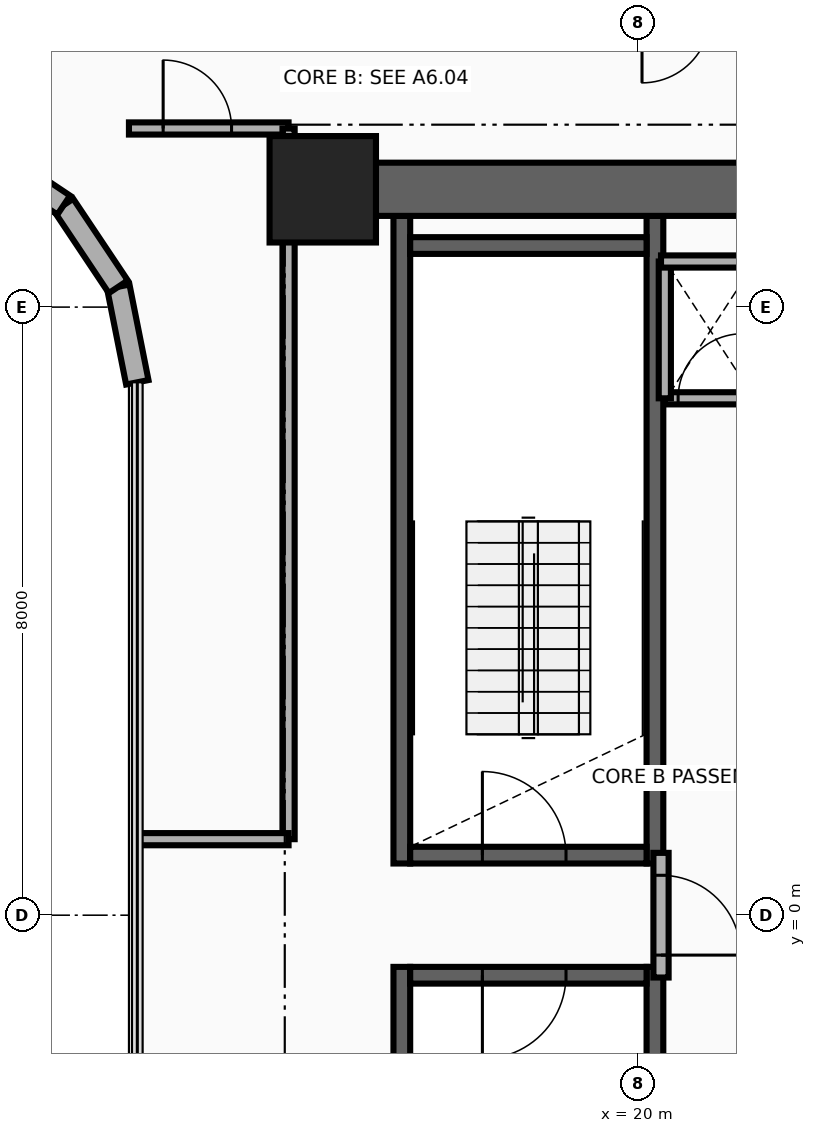
"""IFC4 building model, lengths in metres.
Left out: names, types, materials, properties, quantities, classifications, styles, units other than length and angle.
Written with IfcOpenShell. Run it as: python <this file> out.ifc"""

import sys

from ifc_helpers import new_model, si_unit, direction, frame, frame_2d, origin, origin_2d, place, context, subcontext, project, spatial, rectangle, extrude, source, transform, mapped, element, fill, save


model = new_model("IFC4")
c1 = context("Model", 3, precision=1e-05, world=origin(), true_north=direction((0.0, 1.0)))
c2 = subcontext(c1, "Body", "Model", "MODEL_VIEW")
j1 = project(units=[si_unit("LENGTHUNIT", "METRE"), si_unit("PLANEANGLEUNIT", "RADIAN")], contexts=[c1])
p1 = place(None, origin())
s1 = spatial("IfcSite", under=j1, at=p1, CompositionType="ELEMENT")
p2 = place(p1, origin())
s2 = spatial("IfcBuilding", under=s1, at=p2, CompositionType="ELEMENT")
p3 = place(p2, frame((0.0, 0.0, 81.5)))
s3 = spatial("IfcBuildingStorey", under=s2, at=p3, CompositionType="ELEMENT", Elevation=81.5)
for number, where, z_axis, x_axis in (
    (1, (16.89, 0.68, 0.0), (0.0, 0.0, 1.0), (0.0, 1.0, 0.0)),
    (2, (20.22, 0.68, 0.0), (0.0, 0.0, 1.0), (0.0, 1.0, 0.0)),
):
    element("IfcWall", number, at=place(p3, frame(where, z_axis=z_axis, x_axis=x_axis)), inside=s3, PredefinedType="SHEAR", context=c2, shape_type="SweptSolid", body=[
        extrude(rectangle(XDim=8.52, YDim=0.22, at=frame_2d((4.26, 0.0))), origin(), (0.0, 0.0, 1.0), 3.46),
    ])
p4 = place(p3, frame((17.0, 0.79, 0.0), z_axis=(0.0, 0.0, 1.0), x_axis=(1.0, 0.0, 0.0)))
e3 = element("IfcWall", 3, at=p4, inside=s3, PredefinedType="SHEAR", context=c2, shape_type="SweptSolid", body=[
    extrude(rectangle(XDim=3.11, YDim=0.22, at=frame_2d((1.555, 0.0))), origin(), (0.0, 0.0, 1.0), 3.46),
])
p5 = place(p4, frame((0.95, 0.0, 0.0)))
e4 = element("IfcOpeningElement", 4, at=p5, cuts=e3, PredefinedType="OPENING", context=c2, shape_type="SweptSolid", body=[
    extrude(rectangle(XDim=1.1, YDim=2.15, at=frame_2d((0.55, 1.075))), frame((0.0, 0.125, 0.0), z_axis=(0.0, -1.0, 0.0), x_axis=(1.0, 0.0, 0.0)), (0.0, 0.0, 1.0), 0.25),
])
p6 = place(p3, frame((17.0, 8.81, 0.0), z_axis=(0.0, 0.0, 1.0), x_axis=(1.0, 0.0, 0.0)))
e5 = element("IfcWall", 5, at=p6, inside=s3, PredefinedType="SHEAR", context=c2, shape_type="SweptSolid", body=[
    extrude(rectangle(XDim=3.11, YDim=0.22, at=frame_2d((1.555, 0.0))), origin(), (0.0, 0.0, 1.0), 3.46),
])
for number, where, z_axis, x_axis in (
    (6, (16.89, -9.2, 0.0), (0.0, 0.0, 1.0), (0.0, 1.0, 0.0)),
    (7, (20.22, -9.2, 0.0), (0.0, 0.0, 1.0), (0.0, 1.0, 0.0)),
):
    element("IfcWall", number, at=place(p3, frame(where, z_axis=z_axis, x_axis=x_axis)), inside=s3, PredefinedType="SHEAR", context=c2, shape_type="SweptSolid", body=[
        extrude(rectangle(XDim=8.52, YDim=0.22, at=frame_2d((4.26, 0.0))), origin(), (0.0, 0.0, 1.0), 3.46),
    ])
p7 = place(p3, frame((17.0, -0.79, 0.0), z_axis=(0.0, 0.0, 1.0), x_axis=(1.0, 0.0, 0.0)))
e8 = element("IfcWall", 8, at=p7, inside=s3, PredefinedType="SHEAR", context=c2, shape_type="SweptSolid", body=[
    extrude(rectangle(XDim=3.11, YDim=0.22, at=frame_2d((1.555, 0.0))), origin(), (0.0, 0.0, 1.0), 3.46),
])
p8 = place(p7, frame((0.95, 0.0, 0.0)))
e9 = element("IfcOpeningElement", 9, at=p8, cuts=e8, PredefinedType="OPENING", context=c2, shape_type="SweptSolid", body=[
    extrude(rectangle(XDim=1.1, YDim=2.15, at=frame_2d((0.55, 1.075))), frame((0.0, 0.125, 0.0), z_axis=(0.0, -1.0, 0.0), x_axis=(1.0, 0.0, 0.0)), (0.0, 0.0, 1.0), 0.25),
])
p9 = place(p3, frame((15.85, 9.55, 0.0), z_axis=(0.0, 0.0, 1.0), x_axis=(1.0, 0.0, 0.0)))
e10 = element("IfcWall", 10, at=p9, inside=s3, PredefinedType="SHEAR", context=c2, shape_type="SweptSolid", body=[
    extrude(rectangle(XDim=9.0, YDim=0.7, at=frame_2d((4.5, 0.0))), origin(), (0.0, 0.0, 1.0), 3.46),
])
m1 = source(origin(), c2, "Body", "SweptSolid", [
    extrude(rectangle(XDim=1.4, YDim=1.4, at=origin_2d()), origin(), (0.0, 0.0, 1.0), 3.7),
])
p10 = place(p3, frame((15.85, 9.55, 0.0), z_axis=(0.0, 0.0, 1.0), x_axis=(1.0, 0.0, 0.0)))
e11 = element("IfcColumn", 11, at=p10, inside=s3, PredefinedType="COLUMN", context=c2, shape_type="MappedRepresentation", body=[
    mapped(m1, transform((0.0, 0.0, 0.0), x_axis=(1.0, 0.0, 0.0), y_axis=(0.0, 1.0, 0.0), z_axis=(0.0, 0.0, 1.0), scale=1.0)),
])
p11 = place(p3, frame((13.41, 7.011, 0.0), z_axis=(0.0, 0.0, 1.0), x_axis=(-0.195090163074, 0.980785312019, 0.0)))
e12 = element("IfcWall", 12, at=p11, inside=s3, PredefinedType="SOLIDWALL", context=c2, shape_type="SweptSolid", body=[
    extrude(rectangle(XDim=1.281, YDim=0.3, at=frame_2d((0.641, 0.0))), origin(), (0.0, 0.0, 1.0), 3.46),
])
for number, where, z_axis, x_axis in (
    (13, (13.16, 8.268, 0.0), (0.0, 0.0, 1.0), (-0.556, 0.831, 0.0)),
    (14, (12.442, 9.342, 0.0), (0.0, 0.0, 1.0), (-0.831, 0.556, 0.0)),
):
    element("IfcWall", number, at=place(p3, frame(where, z_axis=z_axis, x_axis=x_axis)), inside=s3, PredefinedType="SOLIDWALL", context=c2, shape_type="SweptSolid", body=[
        extrude(rectangle(XDim=1.292, YDim=0.3, at=frame_2d((0.646, 0.0))), origin(), (0.0, 0.0, 1.0), 3.46),
    ])
p12 = place(p3, frame((20.3, -0.82, 0.0), z_axis=(0.0, 0.0, 1.0), x_axis=(0.0, 1.0, 0.0)))
e15 = element("IfcWall", 15, at=p12, inside=s3, PredefinedType="PARTITIONING", context=c2, shape_type="SweptSolid", body=[
    extrude(rectangle(XDim=1.64, YDim=0.2, at=frame_2d((0.82, 0.0))), origin(), (0.0, 0.0, 1.0), 3.46),
])
p13 = place(p12, frame((0.295, 0.0, 0.0)))
e16 = element("IfcOpeningElement", 16, at=p13, cuts=e15, PredefinedType="OPENING", context=c2, shape_type="SweptSolid", body=[
    extrude(rectangle(XDim=1.05, YDim=2.15, at=frame_2d((0.525, 1.075))), frame((0.0, 0.115, 0.0), z_axis=(0.0, -1.0, 0.0), x_axis=(1.0, 0.0, 0.0)), (0.0, 0.0, 1.0), 0.23),
])
p14 = place(p3, frame((20.35, 6.8, 0.0), z_axis=(0.0, 0.0, 1.0), x_axis=(1.0, 0.0, 0.0)))
e17 = element("IfcWall", 17, at=p14, inside=s3, PredefinedType="PARTITIONING", context=c2, shape_type="SweptSolid", body=[
    extrude(rectangle(XDim=1.2, YDim=0.16, at=frame_2d((0.6, 0.0))), origin(), (0.0, 0.0, 1.0), 3.46),
])
p15 = place(p14, frame((0.175, 0.0, 0.0)))
e18 = element("IfcOpeningElement", 18, at=p15, cuts=e17, PredefinedType="OPENING", context=c2, shape_type="SweptSolid", body=[
    extrude(rectangle(XDim=0.85, YDim=2.05, at=frame_2d((0.425, 1.025))), frame((0.0, 0.095, 0.0), z_axis=(0.0, -1.0, 0.0), x_axis=(1.0, 0.0, 0.0)), (0.0, 0.0, 1.0), 0.19),
])
p16 = place(p3, frame((20.35, 6.8, 0.0), z_axis=(0.0, 0.0, 1.0), x_axis=(0.0, 1.0, 0.0)))
e19 = element("IfcWall", 19, at=p16, inside=s3, PredefinedType="PARTITIONING", context=c2, shape_type="SweptSolid", body=[
    extrude(rectangle(XDim=1.8, YDim=0.16, at=frame_2d((0.9, 0.0))), origin(), (0.0, 0.0, 1.0), 3.46),
])
p17 = place(p3, frame((20.3, 8.6, 0.0), z_axis=(0.0, 0.0, 1.0), x_axis=(1.0, 0.0, 0.0)))
e20 = element("IfcWall", 20, at=p17, inside=s3, PredefinedType="PARTITIONING", context=c2, shape_type="SweptSolid", body=[
    extrude(rectangle(XDim=1.82, YDim=0.16, at=frame_2d((0.91, 0.0))), origin(), (0.0, 0.0, 1.0), 3.46),
])
p18 = place(p3, frame((13.3, 10.35, 0.0), z_axis=(0.0, 0.0, 1.0), x_axis=(1.0, 0.0, 0.0)))
e21 = element("IfcWall", 21, at=p18, inside=s3, PredefinedType="PARTITIONING", context=c2, shape_type="SweptSolid", body=[
    extrude(rectangle(XDim=2.1, YDim=0.16, at=frame_2d((1.05, 0.0))), origin(), (0.0, 0.0, 1.0), 2.583),
])
p19 = place(p18, frame((0.45, 0.0, 0.0)))
e22 = element("IfcOpeningElement", 22, at=p19, cuts=e21, PredefinedType="OPENING", context=c2, shape_type="SweptSolid", body=[
    extrude(rectangle(XDim=0.9, YDim=2.1, at=frame_2d((0.45, 1.05))), frame((0.0, 0.095, 0.0), z_axis=(0.0, -1.0, 0.0), x_axis=(1.0, 0.0, 0.0)), (0.0, 0.0, 1.0), 0.19),
])
p20 = place(p3, frame((15.4, 1.0, 0.0), z_axis=(0.0, 0.0, 1.0), x_axis=(0.0, 1.0, 0.0)))
e23 = element("IfcWall", 23, at=p20, inside=s3, PredefinedType="PARTITIONING", context=c2, shape_type="SweptSolid", body=[
    extrude(rectangle(XDim=9.35, YDim=0.16, at=frame_2d((4.675, 0.0))), origin(), (0.0, 0.0, 1.0), 2.245),
])
p21 = place(p3, frame((13.41, 1.0, 0.0), z_axis=(0.0, 0.0, 1.0), x_axis=(1.0, 0.0, 0.0)))
e24 = element("IfcWall", 24, at=p21, inside=s3, PredefinedType="PARTITIONING", context=c2, shape_type="SweptSolid", body=[
    extrude(rectangle(XDim=1.99, YDim=0.16, at=frame_2d((0.995, 0.0))), origin(), (0.0, 0.0, 1.0), 2.245),
])
p22 = place(p13, frame((1.05, 0.0, 0.0), z_axis=(0.0, 0.0, 1.0), x_axis=(-1.0, 0.0, 0.0)))
e25 = element("IfcDoor", 25, at=p22, inside=s3, OperationType="SINGLE_SWING_LEFT", PredefinedType="DOOR", context=c2, shape_type="SweptSolid", body=[
    extrude(rectangle(XDim=1.05, YDim=2.15, at=frame_2d((0.525, 1.075))), frame((0.0, 0.025, 0.0), z_axis=(0.0, -1.0, 0.0), x_axis=(1.0, 0.0, 0.0)), (0.0, 0.0, 1.0), 0.05),
])
fill(e16, e25)
p23 = place(p5, origin())
e26 = element("IfcDoor", 26, at=p23, inside=s3, OperationType="SINGLE_SWING_RIGHT", PredefinedType="DOOR", context=c2, shape_type="SweptSolid", body=[
    extrude(rectangle(XDim=1.1, YDim=2.15, at=frame_2d((0.55, 1.075))), frame((0.0, 0.025, 0.0), z_axis=(0.0, -1.0, 0.0), x_axis=(1.0, 0.0, 0.0)), (0.0, 0.0, 1.0), 0.05),
])
fill(e4, e26)
p24 = place(p8, frame((1.1, 0.0, 0.0), z_axis=(0.0, 0.0, 1.0), x_axis=(-1.0, 0.0, 0.0)))
e27 = element("IfcDoor", 27, at=p24, inside=s3, OperationType="SINGLE_SWING_LEFT", PredefinedType="DOOR", context=c2, shape_type="SweptSolid", body=[
    extrude(rectangle(XDim=1.1, YDim=2.15, at=frame_2d((0.55, 1.075))), frame((0.0, 0.025, 0.0), z_axis=(0.0, -1.0, 0.0), x_axis=(1.0, 0.0, 0.0)), (0.0, 0.0, 1.0), 0.05),
])
fill(e9, e27)
p25 = place(p15, origin())
e28 = element("IfcDoor", 28, at=p25, inside=s3, OperationType="SINGLE_SWING_RIGHT", PredefinedType="DOOR", context=c2, shape_type="SweptSolid", body=[
    extrude(rectangle(XDim=0.85, YDim=2.05, at=frame_2d((0.425, 1.025))), frame((0.0, 0.025, 0.0), z_axis=(0.0, -1.0, 0.0), x_axis=(1.0, 0.0, 0.0)), (0.0, 0.0, 1.0), 0.05),
])
fill(e18, e28)
p26 = place(p19, origin())
e29 = element("IfcDoor", 29, at=p26, inside=s3, OperationType="SINGLE_SWING_LEFT", PredefinedType="DOOR", context=c2, shape_type="SweptSolid", body=[
    extrude(rectangle(XDim=0.9, YDim=2.1, at=frame_2d((0.45, 1.05))), frame((0.0, 0.025, 0.0), z_axis=(0.0, -1.0, 0.0), x_axis=(1.0, 0.0, 0.0)), (0.0, 0.0, 1.0), 0.05),
])
fill(e22, e29)
save(model, sys.argv[1])
